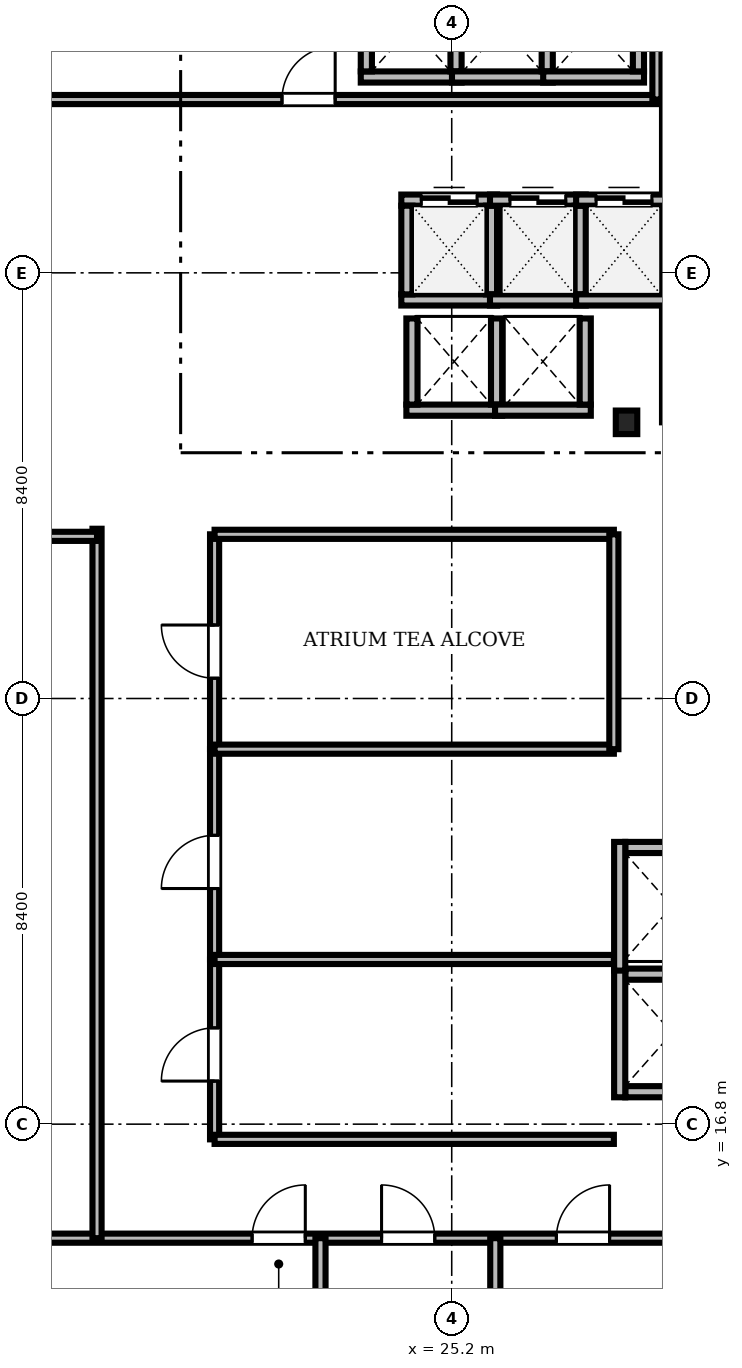
"""IFC4 building model, lengths in metres.
Left out: names, types, materials, properties, quantities, classifications, styles, units other than length and angle.
Written with IfcOpenShell. Run it as: python <this file> out.ifc"""

import sys

from ifc_helpers import new_model, si_unit, direction, frame, frame_2d, origin, origin_2d, place, context, subcontext, project, spatial, rectangle, i_section, extrude, source, transform, mapped, element, fill, save


model = new_model("IFC4")
c1 = context("Model", 3, precision=1e-05, world=origin(), true_north=direction((0.0, 1.0)))
c2 = subcontext(c1, "Body", "Model", "MODEL_VIEW")
j1 = project(units=[si_unit("LENGTHUNIT", "METRE"), si_unit("PLANEANGLEUNIT", "RADIAN")], contexts=[c1])
p1 = place(None, origin())
s1 = spatial("IfcSite", under=j1, at=p1, CompositionType="ELEMENT")
p2 = place(p1, origin())
s2 = spatial("IfcBuilding", under=s1, at=p2, CompositionType="ELEMENT")
p3 = place(p2, frame((0.0, 0.0, 103.7)))
s3 = spatial("IfcBuildingStorey", under=s2, at=p3, CompositionType="ELEMENT", Elevation=103.7)
m1 = source(origin(), c2, "Body", "SweptSolid", [
    extrude(i_section(OverallWidth=0.424, OverallDepth=0.465, WebThickness=0.035, FlangeThickness=0.056, FilletRadius=0.015, at=origin_2d()), origin(), (0.0, 0.0, 1.0), 3.56),
])
p4 = place(p3, frame((28.65, 30.65, 0.0), z_axis=(0.0, 0.0, 1.0), x_axis=(1.0, 0.0, 0.0)))
e1 = element("IfcColumn", 1, at=p4, inside=s3, PredefinedType="COLUMN", context=c2, shape_type="MappedRepresentation", body=[
    mapped(m1, transform((0.0, 0.0, 0.0), scale=1.0)),
])
m2 = source(origin(), c2, "Body", "SweptSolid", [
    extrude(rectangle(XDim=1.99, YDim=0.22, at=frame_2d((0.995, 0.0))), origin(), (0.0, 0.0, 1.0), 3.56),
])
p5 = place(p3, frame((23.405, 37.465, 0.0), z_axis=(0.0, 0.0, 1.0), x_axis=(1.0, 0.0, 0.0)))
e2 = element("IfcWall", 2, at=p5, inside=s3, PredefinedType="SOLIDWALL", context=c2, shape_type="MappedRepresentation", body=[
    mapped(m2, transform((0.0, 0.0, 0.0), scale=1.0)),
])
m3 = source(origin(), c2, "Body", "SweptSolid", [
    extrude(rectangle(XDim=1.75, YDim=0.22, at=frame_2d((0.875, 0.0))), origin(), (0.0, 0.0, 1.0), 3.56),
])
for number, where, z_axis, x_axis in (
    (3, (23.515, 37.575, 0.0), (0.0, 0.0, 1.0), (0.0, 1.0, 0.0)),
    (4, (25.285, 37.575, 0.0), (0.0, 0.0, 1.0), (0.0, 1.0, 0.0)),
):
    element("IfcWall", number, at=place(p3, frame(where, z_axis=z_axis, x_axis=x_axis)), inside=s3, PredefinedType="SOLIDWALL", context=c2, shape_type="MappedRepresentation", body=[
        mapped(m3, transform((0.0, 0.0, 0.0), scale=1.0)),
    ])
p6 = place(p3, frame((25.205, 37.465, 0.0), z_axis=(0.0, 0.0, 1.0), x_axis=(1.0, 0.0, 0.0)))
e5 = element("IfcWall", 5, at=p6, inside=s3, PredefinedType="SOLIDWALL", context=c2, shape_type="MappedRepresentation", body=[
    mapped(m2, transform((0.0, 0.0, 0.0), scale=1.0)),
])
p7 = place(p3, frame((27.085, 37.575, 0.0), z_axis=(0.0, 0.0, 1.0), x_axis=(0.0, 1.0, 0.0)))
e6 = element("IfcWall", 6, at=p7, inside=s3, PredefinedType="SOLIDWALL", context=c2, shape_type="MappedRepresentation", body=[
    mapped(m3, transform((0.0, 0.0, 0.0), scale=1.0)),
])
m4 = source(origin(), c2, "Body", "SweptSolid", [
    extrude(rectangle(XDim=1.99, YDim=0.22, at=frame_2d((0.995, 0.0))), origin(), (0.0, 0.0, 1.0), 3.56),
])
p8 = place(p3, frame((27.005, 37.465, 0.0), z_axis=(0.0, 0.0, 1.0), x_axis=(1.0, 0.0, 0.0)))
e7 = element("IfcWall", 7, at=p8, inside=s3, PredefinedType="SOLIDWALL", context=c2, shape_type="MappedRepresentation", body=[
    mapped(m4, transform((0.0, 0.0, 0.0), scale=1.0)),
])
p9 = place(p3, frame((28.885, 37.575, 0.0), z_axis=(0.0, 0.0, 1.0), x_axis=(0.0, 1.0, 0.0)))
e8 = element("IfcWall", 8, at=p9, inside=s3, PredefinedType="SOLIDWALL", context=c2, shape_type="MappedRepresentation", body=[
    mapped(m3, transform((0.0, 0.0, 0.0), scale=1.0)),
])
m5 = source(origin(), c2, "Body", "SweptSolid", [
    extrude(rectangle(XDim=1.89, YDim=0.22, at=frame_2d((0.945, 0.0))), origin(), (0.0, 0.0, 1.0), 3.56),
])
p10 = place(p3, frame((24.205, 33.065, 0.0), z_axis=(0.0, 0.0, 1.0), x_axis=(1.0, 0.0, 0.0)))
e9 = element("IfcWall", 9, at=p10, inside=s3, PredefinedType="SOLIDWALL", context=c2, shape_type="MappedRepresentation", body=[
    mapped(m5, transform((0.0, 0.0, 0.0), scale=1.0)),
])
p11 = place(p3, frame((24.205, 35.035, 0.0), z_axis=(0.0, 0.0, 1.0), x_axis=(1.0, 0.0, 0.0)))
e10 = element("IfcWall", 10, at=p11, inside=s3, PredefinedType="SOLIDWALL", context=c2, shape_type="MappedRepresentation", body=[
    mapped(m5, transform((0.0, 0.0, 0.0), scale=1.0)),
])
m6 = source(origin(), c2, "Body", "SweptSolid", [
    extrude(rectangle(XDim=1.1, YDim=2.2, at=frame_2d((0.55, 1.1))), frame((0.0, 0.12, 0.0), z_axis=(0.0, -1.0, 0.0), x_axis=(1.0, 0.0, 0.0)), (0.0, 0.0, 1.0), 0.24),
])
p12 = place(p11, frame((0.395, 0.0, 0.0)))
e11 = element("IfcOpeningElement", 11, at=p12, cuts=e10, PredefinedType="OPENING", context=c2, shape_type="MappedRepresentation", body=[
    mapped(m6, transform((0.0, 0.0, 0.0), scale=1.0)),
])
for number, where, z_axis, x_axis in (
    (12, (24.315, 33.175, 0.0), (0.0, 0.0, 1.0), (0.0, 1.0, 0.0)),
    (13, (25.985, 33.175, 0.0), (0.0, 0.0, 1.0), (0.0, 1.0, 0.0)),
):
    element("IfcWall", number, at=place(p3, frame(where, z_axis=z_axis, x_axis=x_axis)), inside=s3, PredefinedType="SOLIDWALL", context=c2, shape_type="MappedRepresentation", body=[
        mapped(m3, transform((0.0, 0.0, 0.0), scale=1.0)),
    ])
p13 = place(p3, frame((25.955, 33.065, 0.0), z_axis=(0.0, 0.0, 1.0), x_axis=(1.0, 0.0, 0.0)))
e14 = element("IfcWall", 14, at=p13, inside=s3, PredefinedType="SOLIDWALL", context=c2, shape_type="MappedRepresentation", body=[
    mapped(m5, transform((0.0, 0.0, 0.0), scale=1.0)),
])
p14 = place(p3, frame((25.955, 35.035, 0.0), z_axis=(0.0, 0.0, 1.0), x_axis=(1.0, 0.0, 0.0)))
e15 = element("IfcWall", 15, at=p14, inside=s3, PredefinedType="SOLIDWALL", context=c2, shape_type="MappedRepresentation", body=[
    mapped(m5, transform((0.0, 0.0, 0.0), scale=1.0)),
])
p15 = place(p14, frame((0.395, 0.0, 0.0)))
e16 = element("IfcOpeningElement", 16, at=p15, cuts=e15, PredefinedType="OPENING", context=c2, shape_type="MappedRepresentation", body=[
    mapped(m6, transform((0.0, 0.0, 0.0), scale=1.0)),
])
p16 = place(p3, frame((27.735, 33.175, 0.0), z_axis=(0.0, 0.0, 1.0), x_axis=(0.0, 1.0, 0.0)))
e17 = element("IfcWall", 17, at=p16, inside=s3, PredefinedType="SOLIDWALL", context=c2, shape_type="MappedRepresentation", body=[
    mapped(m3, transform((0.0, 0.0, 0.0), scale=1.0)),
])
p17 = place(p3, frame((27.655, 33.065, 0.0), z_axis=(0.0, 0.0, 1.0), x_axis=(1.0, 0.0, 0.0)))
e18 = element("IfcWall", 18, at=p17, inside=s3, PredefinedType="SOLIDWALL", context=c2, shape_type="MappedRepresentation", body=[
    mapped(m5, transform((0.0, 0.0, 0.0), scale=1.0)),
])
p18 = place(p3, frame((27.655, 35.035, 0.0), z_axis=(0.0, 0.0, 1.0), x_axis=(1.0, 0.0, 0.0)))
e19 = element("IfcWall", 19, at=p18, inside=s3, PredefinedType="SOLIDWALL", context=c2, shape_type="MappedRepresentation", body=[
    mapped(m5, transform((0.0, 0.0, 0.0), scale=1.0)),
])
p19 = place(p18, frame((0.395, 0.0, 0.0)))
e20 = element("IfcOpeningElement", 20, at=p19, cuts=e19, PredefinedType="OPENING", context=c2, shape_type="MappedRepresentation", body=[
    mapped(m6, transform((0.0, 0.0, 0.0), scale=1.0)),
])
m7 = source(origin(), c2, "Body", "SweptSolid", [
    extrude(rectangle(XDim=1.89, YDim=0.22, at=frame_2d((0.945, 0.0))), origin(), (0.0, 0.0, 1.0), 3.56),
])
p20 = place(p3, frame((24.305, 30.89, 0.0), z_axis=(0.0, 0.0, 1.0), x_axis=(1.0, 0.0, 0.0)))
e21 = element("IfcWall", 21, at=p20, inside=s3, PredefinedType="SOLIDWALL", context=c2, shape_type="MappedRepresentation", body=[
    mapped(m7, transform((0.0, 0.0, 0.0), scale=1.0)),
])
m8 = source(origin(), c2, "Body", "SweptSolid", [
    extrude(rectangle(XDim=1.7, YDim=0.22, at=frame_2d((0.85, 0.0))), origin(), (0.0, 0.0, 1.0), 3.56),
])
for number, where, z_axis, x_axis in (
    (22, (24.415, 31.0, 0.0), (0.0, 0.0, 1.0), (0.0, 1.0, 0.0)),
    (23, (26.085, 31.0, 0.0), (0.0, 0.0, 1.0), (0.0, 1.0, 0.0)),
):
    element("IfcWall", number, at=place(p3, frame(where, z_axis=z_axis, x_axis=x_axis)), inside=s3, PredefinedType="SOLIDWALL", context=c2, shape_type="MappedRepresentation", body=[
        mapped(m8, transform((0.0, 0.0, 0.0), scale=1.0)),
    ])
p21 = place(p3, frame((26.055, 30.89, 0.0), z_axis=(0.0, 0.0, 1.0), x_axis=(1.0, 0.0, 0.0)))
e24 = element("IfcWall", 24, at=p21, inside=s3, PredefinedType="SOLIDWALL", context=c2, shape_type="MappedRepresentation", body=[
    mapped(m7, transform((0.0, 0.0, 0.0), scale=1.0)),
])
p22 = place(p3, frame((27.835, 31.0, 0.0), z_axis=(0.0, 0.0, 1.0), x_axis=(0.0, 1.0, 0.0)))
e25 = element("IfcWall", 25, at=p22, inside=s3, PredefinedType="SOLIDWALL", context=c2, shape_type="MappedRepresentation", body=[
    mapped(m8, transform((0.0, 0.0, 0.0), scale=1.0)),
])
m9 = source(origin(), c2, "Body", "SweptSolid", [
    extrude(rectangle(XDim=1.85, YDim=0.22, at=frame_2d((0.925, 0.0))), origin(), (0.0, 0.0, 1.0), 3.56),
])
for number, where, z_axis, x_axis in (
    (26, (28.625, 17.44, 0.0), (0.0, 0.0, 1.0), (1.0, 0.0, 0.0)),
    (27, (28.625, 19.76, 0.0), (0.0, 0.0, 1.0), (1.0, 0.0, 0.0)),
):
    element("IfcWall", number, at=place(p3, frame(where, z_axis=z_axis, x_axis=x_axis)), inside=s3, PredefinedType="SOLIDWALL", context=c2, shape_type="MappedRepresentation", body=[
        mapped(m9, transform((0.0, 0.0, 0.0), scale=1.0)),
    ])
m10 = source(origin(), c2, "Body", "SweptSolid", [
    extrude(rectangle(XDim=2.54, YDim=0.22, at=frame_2d((1.27, 0.0))), origin(), (0.0, 0.0, 1.0), 3.56),
])
p23 = place(p3, frame((28.515, 17.33, 0.0), z_axis=(0.0, 0.0, 1.0), x_axis=(0.0, 1.0, 0.0)))
e28 = element("IfcWall", 28, at=p23, inside=s3, PredefinedType="SOLIDWALL", context=c2, shape_type="MappedRepresentation", body=[
    mapped(m10, transform((0.0, 0.0, 0.0), scale=1.0)),
])
p24 = place(p3, frame((28.625, 22.26, 0.0), z_axis=(0.0, 0.0, 1.0), x_axis=(1.0, 0.0, 0.0)))
e29 = element("IfcWall", 29, at=p24, inside=s3, PredefinedType="SOLIDWALL", context=c2, shape_type="MappedRepresentation", body=[
    mapped(m9, transform((0.0, 0.0, 0.0), scale=1.0)),
])
p25 = place(p3, frame((28.515, 19.83, 0.0), z_axis=(0.0, 0.0, 1.0), x_axis=(0.0, 1.0, 0.0)))
e30 = element("IfcWall", 30, at=p25, inside=s3, PredefinedType="SOLIDWALL", context=c2, shape_type="MappedRepresentation", body=[
    mapped(m10, transform((0.0, 0.0, 0.0), scale=1.0)),
])
m11 = source(origin(), c2, "Body", "SweptSolid", [
    extrude(rectangle(XDim=46.156, YDim=0.18, at=frame_2d((23.078, 0.0))), origin(), (0.0, 0.0, 1.0), 2.802),
])
p26 = place(p3, frame((6.922, 14.55, 0.0), z_axis=(0.0, 0.0, 1.0), x_axis=(1.0, 0.0, 0.0)))
e31 = element("IfcWall", 31, at=p26, inside=s3, PredefinedType="PARTITIONING", context=c2, shape_type="MappedRepresentation", body=[
    mapped(m11, transform((0.0, 0.0, 0.0), scale=1.0)),
])
m12 = source(origin(), c2, "Body", "SweptSolid", [
    extrude(rectangle(XDim=1.05, YDim=2.2, at=frame_2d((0.525, 1.1))), frame((0.0, 0.1, 0.0), z_axis=(0.0, -1.0, 0.0), x_axis=(1.0, 0.0, 0.0)), (0.0, 0.0, 1.0), 0.2),
])
p27 = place(p26, frame((14.338, 0.0, 0.0)))
e32 = element("IfcOpeningElement", 32, at=p27, cuts=e31, PredefinedType="OPENING", context=c2, shape_type="MappedRepresentation", body=[
    mapped(m12, transform((0.0, 0.0, 0.0), scale=1.0)),
])
p28 = place(p26, frame((16.893, 0.0, 0.0)))
e33 = element("IfcOpeningElement", 33, at=p28, cuts=e31, PredefinedType="OPENING", context=c2, shape_type="MappedRepresentation", body=[
    mapped(m12, transform((0.0, 0.0, 0.0), scale=1.0)),
])
p29 = place(p26, frame((20.344, 0.0, 0.0)))
e34 = element("IfcOpeningElement", 34, at=p29, cuts=e31, PredefinedType="OPENING", context=c2, shape_type="MappedRepresentation", body=[
    mapped(m12, transform((0.0, 0.0, 0.0), scale=1.0)),
])
m13 = source(origin(), c2, "Body", "SweptSolid", [
    extrude(rectangle(XDim=0.95, YDim=2.15, at=frame_2d((0.475, 1.075))), frame((0.0, 0.1, 0.0), z_axis=(0.0, -1.0, 0.0), x_axis=(1.0, 0.0, 0.0)), (0.0, 0.0, 1.0), 0.2),
])
p30 = place(p26, frame((25.842, 0.0, 0.0)))
e35 = element("IfcOpeningElement", 35, at=p30, cuts=e31, PredefinedType="OPENING", context=c2, shape_type="MappedRepresentation", body=[
    mapped(m13, transform((0.0, 0.0, 0.0), scale=1.0)),
])
p31 = place(p26, frame((29.754, 0.0, 0.0)))
e36 = element("IfcOpeningElement", 36, at=p31, cuts=e31, PredefinedType="OPENING", context=c2, shape_type="MappedRepresentation", body=[
    mapped(m12, transform((0.0, 0.0, 0.0), scale=1.0)),
])
p32 = place(p26, frame((35.683, 0.0, 0.0)))
e37 = element("IfcOpeningElement", 37, at=p32, cuts=e31, PredefinedType="OPENING", context=c2, shape_type="MappedRepresentation", body=[
    mapped(m12, transform((0.0, 0.0, 0.0), scale=1.0)),
])
p33 = place(p26, frame((41.828, 0.0, 0.0)))
e38 = element("IfcOpeningElement", 38, at=p33, cuts=e31, PredefinedType="OPENING", context=c2, shape_type="MappedRepresentation", body=[
    mapped(m12, transform((0.0, 0.0, 0.0), scale=1.0)),
])
m14 = source(origin(), c2, "Body", "SweptSolid", [
    extrude(rectangle(XDim=22.328, YDim=0.18, at=frame_2d((11.164, 0.0))), origin(), (0.0, 0.0, 1.0), 2.802),
])
p34 = place(p3, frame((6.922, 37.02, 0.0), z_axis=(0.0, 0.0, 1.0), x_axis=(1.0, 0.0, 0.0)))
e39 = element("IfcWall", 39, at=p34, inside=s3, PredefinedType="PARTITIONING", context=c2, shape_type="MappedRepresentation", body=[
    mapped(m14, transform((0.0, 0.0, 0.0), scale=1.0)),
])
p35 = place(p34, frame((14.928, 0.0, 0.0)))
e40 = element("IfcOpeningElement", 40, at=p35, cuts=e39, PredefinedType="OPENING", context=c2, shape_type="MappedRepresentation", body=[
    mapped(m12, transform((0.0, 0.0, 0.0), scale=1.0)),
])
m15 = source(origin(), c2, "Body", "SweptSolid", [
    extrude(rectangle(XDim=4.24, YDim=0.18, at=frame_2d((2.12, 0.0))), origin(), (0.0, 0.0, 1.0), 2.952),
])
p36 = place(p3, frame((20.52, 24.2, 0.0), z_axis=(0.0, 0.0, 1.0), x_axis=(0.0, 1.0, 0.0)))
e41 = element("IfcWall", 41, at=p36, inside=s3, PredefinedType="PARTITIONING", context=c2, shape_type="MappedRepresentation", body=[
    mapped(m15, transform((0.0, 0.0, 0.0), scale=1.0)),
])
p37 = place(p36, frame((1.4, 0.0, 0.0)))
e42 = element("IfcOpeningElement", 42, at=p37, cuts=e41, PredefinedType="OPENING", context=c2, shape_type="MappedRepresentation", body=[
    mapped(m12, transform((0.0, 0.0, 0.0), scale=1.0)),
])
m16 = source(origin(), c2, "Body", "SweptSolid", [
    extrude(rectangle(XDim=4.15, YDim=0.18, at=frame_2d((2.075, 0.0))), origin(), (0.0, 0.0, 1.0), 3.222),
])
p38 = place(p3, frame((20.52, 20.05, 0.0), z_axis=(0.0, 0.0, 1.0), x_axis=(0.0, 1.0, 0.0)))
e43 = element("IfcWall", 43, at=p38, inside=s3, PredefinedType="PARTITIONING", context=c2, shape_type="MappedRepresentation", body=[
    mapped(m16, transform((0.0, 0.0, 0.0), scale=1.0)),
])
p39 = place(p38, frame((1.4, 0.0, 0.0)))
e44 = element("IfcOpeningElement", 44, at=p39, cuts=e43, PredefinedType="OPENING", context=c2, shape_type="MappedRepresentation", body=[
    mapped(m12, transform((0.0, 0.0, 0.0), scale=1.0)),
])
m17 = source(origin(), c2, "Body", "SweptSolid", [
    extrude(rectangle(XDim=3.55, YDim=0.18, at=frame_2d((1.775, 0.0))), origin(), (0.0, 0.0, 1.0), 2.952),
])
p40 = place(p3, frame((20.52, 16.5, 0.0), z_axis=(0.0, 0.0, 1.0), x_axis=(0.0, 1.0, 0.0)))
e45 = element("IfcWall", 45, at=p40, inside=s3, PredefinedType="PARTITIONING", context=c2, shape_type="MappedRepresentation", body=[
    mapped(m17, transform((0.0, 0.0, 0.0), scale=1.0)),
])
p41 = place(p40, frame((1.15, 0.0, 0.0)))
e46 = element("IfcOpeningElement", 46, at=p41, cuts=e45, PredefinedType="OPENING", context=c2, shape_type="MappedRepresentation", body=[
    mapped(m12, transform((0.0, 0.0, 0.0), scale=1.0)),
])
m18 = source(origin(), c2, "Body", "SweptSolid", [
    extrude(rectangle(XDim=14.0, YDim=0.18, at=frame_2d((7.0, 0.0))), origin(), (0.0, 0.0, 1.0), 2.952),
])
p42 = place(p3, frame((18.2, 14.55, 0.0), z_axis=(0.0, 0.0, 1.0), x_axis=(0.0, 1.0, 0.0)))
e47 = element("IfcWall", 47, at=p42, inside=s3, PredefinedType="PARTITIONING", context=c2, shape_type="MappedRepresentation", body=[
    mapped(m18, transform((0.0, 0.0, 0.0), scale=1.0)),
])
m19 = source(origin(), c2, "Body", "SweptSolid", [
    extrude(rectangle(XDim=12.428, YDim=0.2, at=frame_2d((6.214, 0.0))), origin(), (0.0, 0.0, 1.0), 2.802),
])
for number, where, z_axis, x_axis in (
    (48, (22.61, 2.122, 0.0), (0.0, 0.0, 1.0), (0.0, 1.0, 0.0)),
    (49, (26.06, 2.122, 0.0), (0.0, 0.0, 1.0), (0.0, 1.0, 0.0)),
):
    element("IfcWall", number, at=place(p3, frame(where, z_axis=z_axis, x_axis=x_axis)), inside=s3, PredefinedType="PARTITIONING", context=c2, shape_type="MappedRepresentation", body=[
        mapped(m19, transform((0.0, 0.0, 0.0), scale=1.0)),
    ])
m20 = source(origin(), c2, "Body", "SweptSolid", [
    extrude(rectangle(XDim=11.47, YDim=0.18, at=frame_2d((5.735, 0.0))), origin(), (0.0, 0.0, 1.0), 2.802),
])
p43 = place(p3, frame((6.73, 28.4, 0.0), z_axis=(0.0, 0.0, 1.0), x_axis=(1.0, 0.0, 0.0)))
e50 = element("IfcWall", 50, at=p43, inside=s3, PredefinedType="PARTITIONING", context=c2, shape_type="MappedRepresentation", body=[
    mapped(m20, transform((0.0, 0.0, 0.0), scale=1.0)),
])
m21 = source(origin(), c2, "Body", "SweptSolid", [
    extrude(rectangle(XDim=11.45, YDim=0.18, at=frame_2d((5.725, 0.0))), origin(), (0.0, 0.0, 1.0), 2.802),
])
p44 = place(p3, frame((29.25, 37.02, 0.0), z_axis=(0.0, 0.0, 1.0), x_axis=(0.0, 1.0, 0.0)))
e51 = element("IfcWall", 51, at=p44, inside=s3, PredefinedType="PARTITIONING", context=c2, shape_type="MappedRepresentation", body=[
    mapped(m21, transform((0.0, 0.0, 0.0), scale=1.0)),
])
m22 = source(origin(), c2, "Body", "SweptSolid", [
    extrude(rectangle(XDim=7.88, YDim=0.18, at=frame_2d((3.94, 0.0))), origin(), (0.0, 0.0, 1.0), 3.56),
])
for number, where, z_axis, x_axis in (
    (52, (20.52, 16.5, 0.0), (0.0, 0.0, 1.0), (1.0, 0.0, 0.0)),
    (53, (20.52, 20.05, 0.0), (0.0, 0.0, 1.0), (1.0, 0.0, 0.0)),
    (54, (20.52, 24.2, 0.0), (0.0, 0.0, 1.0), (1.0, 0.0, 0.0)),
    (55, (20.52, 28.44, 0.0), (0.0, 0.0, 1.0), (1.0, 0.0, 0.0)),
):
    element("IfcWall", number, at=place(p3, frame(where, z_axis=z_axis, x_axis=x_axis)), inside=s3, PredefinedType="PARTITIONING", context=c2, shape_type="MappedRepresentation", body=[
        mapped(m22, transform((0.0, 0.0, 0.0), scale=1.0)),
    ])
p45 = place(p3, frame((28.4, 24.2, 0.0), z_axis=(0.0, 0.0, 1.0), x_axis=(0.0, 1.0, 0.0)))
e56 = element("IfcWall", 56, at=p45, inside=s3, PredefinedType="PARTITIONING", context=c2, shape_type="MappedRepresentation", body=[
    mapped(m15, transform((0.0, 0.0, 0.0), scale=1.0)),
])
m23 = source(origin(), c2, "Body", "SweptSolid", [
    extrude(rectangle(XDim=1.1, YDim=2.2, at=frame_2d((0.55, 1.1))), frame((0.0, 0.025, 0.0), z_axis=(0.0, -1.0, 0.0), x_axis=(1.0, 0.0, 0.0)), (0.0, 0.0, 1.0), 0.05),
])
p46 = place(p12, origin())
e57 = element("IfcDoor", 57, at=p46, inside=s3, OperationType="DOUBLE_DOOR_SLIDING", PredefinedType="DOOR", context=c2, shape_type="MappedRepresentation", body=[
    mapped(m23, transform((0.0, 0.0, 0.0), scale=1.0)),
])
fill(e11, e57)
p47 = place(p15, origin())
e58 = element("IfcDoor", 58, at=p47, inside=s3, OperationType="DOUBLE_DOOR_SLIDING", PredefinedType="DOOR", context=c2, shape_type="MappedRepresentation", body=[
    mapped(m23, transform((0.0, 0.0, 0.0), scale=1.0)),
])
fill(e16, e58)
p48 = place(p19, origin())
e59 = element("IfcDoor", 59, at=p48, inside=s3, OperationType="DOUBLE_DOOR_SLIDING", PredefinedType="DOOR", context=c2, shape_type="MappedRepresentation", body=[
    mapped(m23, transform((0.0, 0.0, 0.0), scale=1.0)),
])
fill(e20, e59)
m24 = source(origin(), c2, "Body", "SweptSolid", [
    extrude(rectangle(XDim=1.05, YDim=2.2, at=frame_2d((0.525, 1.1))), frame((0.0, 0.025, 0.0), z_axis=(0.0, -1.0, 0.0), x_axis=(1.0, 0.0, 0.0)), (0.0, 0.0, 1.0), 0.05),
])
p49 = place(p27, origin())
e60 = element("IfcDoor", 60, at=p49, inside=s3, OperationType="SINGLE_SWING_RIGHT", PredefinedType="DOOR", context=c2, shape_type="MappedRepresentation", body=[
    mapped(m24, transform((0.0, 0.0, 0.0), scale=1.0)),
])
fill(e32, e60)
p50 = place(p28, origin())
e61 = element("IfcDoor", 61, at=p50, inside=s3, OperationType="SINGLE_SWING_LEFT", PredefinedType="DOOR", context=c2, shape_type="MappedRepresentation", body=[
    mapped(m24, transform((0.0, 0.0, 0.0), scale=1.0)),
])
fill(e33, e61)
p51 = place(p29, origin())
e62 = element("IfcDoor", 62, at=p51, inside=s3, OperationType="SINGLE_SWING_RIGHT", PredefinedType="DOOR", context=c2, shape_type="MappedRepresentation", body=[
    mapped(m24, transform((0.0, 0.0, 0.0), scale=1.0)),
])
fill(e34, e62)
p52 = place(p35, origin())
e63 = element("IfcDoor", 63, at=p52, inside=s3, OperationType="SINGLE_SWING_RIGHT", PredefinedType="DOOR", context=c2, shape_type="MappedRepresentation", body=[
    mapped(m24, transform((0.0, 0.0, 0.0), scale=1.0)),
])
fill(e40, e63)
p53 = place(p37, origin())
e64 = element("IfcDoor", 64, at=p53, inside=s3, OperationType="SINGLE_SWING_RIGHT", PredefinedType="DOOR", context=c2, shape_type="MappedRepresentation", body=[
    mapped(m24, transform((0.0, 0.0, 0.0), scale=1.0)),
])
fill(e42, e64)
p54 = place(p39, origin())
e65 = element("IfcDoor", 65, at=p54, inside=s3, OperationType="SINGLE_SWING_LEFT", PredefinedType="DOOR", context=c2, shape_type="MappedRepresentation", body=[
    mapped(m24, transform((0.0, 0.0, 0.0), scale=1.0)),
])
fill(e44, e65)
p55 = place(p41, origin())
e66 = element("IfcDoor", 66, at=p55, inside=s3, OperationType="SINGLE_SWING_LEFT", PredefinedType="DOOR", context=c2, shape_type="MappedRepresentation", body=[
    mapped(m24, transform((0.0, 0.0, 0.0), scale=1.0)),
])
fill(e46, e66)
save(model, sys.argv[1])
